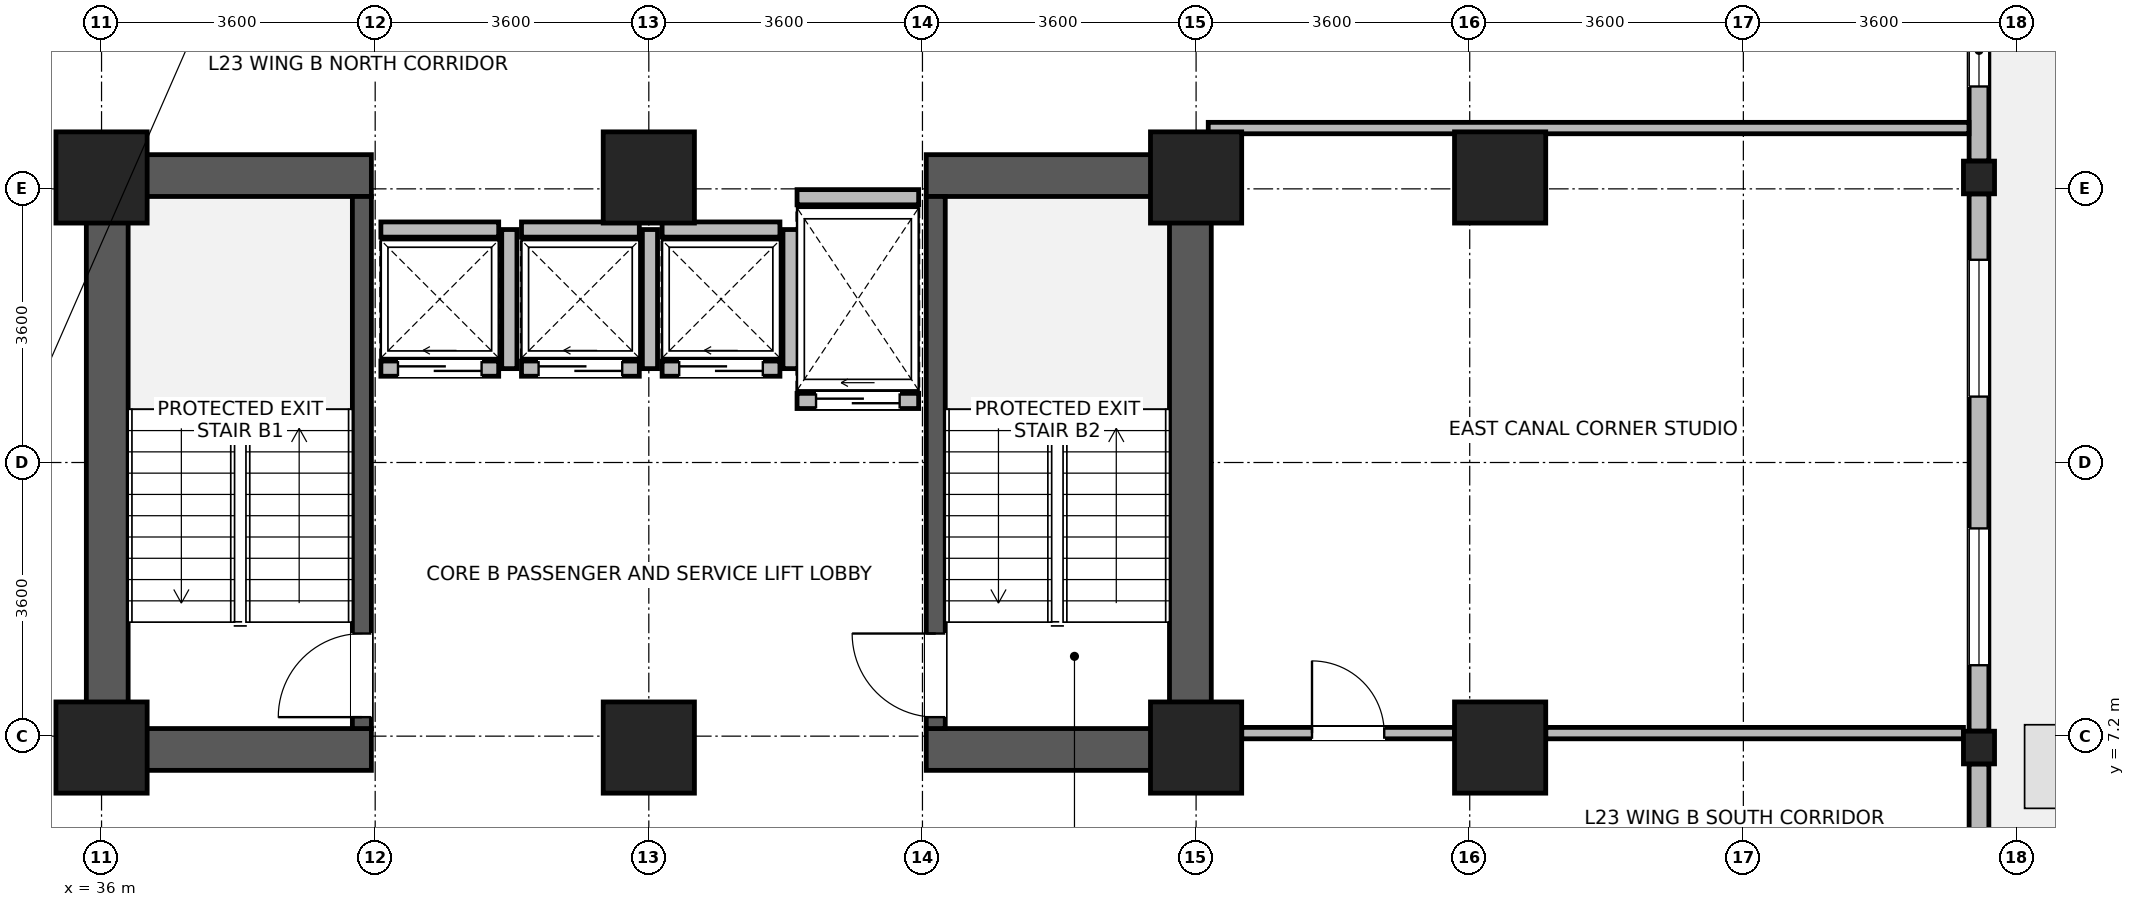
"""IFC4 building model, lengths in metres.
Left out: names, types, materials, properties, quantities, classifications, styles, units other than length and angle.
Written with IfcOpenShell. Run it as: python <this file> out.ifc"""

import sys

from ifc_helpers import new_model, si_unit, direction, frame, frame_2d, origin, origin_2d, place, context, subcontext, project, spatial, rectangle, i_section, extrude, source, transform, mapped, element, fill, save


model = new_model("IFC4")
c1 = context("Model", 3, precision=1e-05, world=origin(), true_north=direction((0.0, 1.0)))
c2 = subcontext(c1, "Body", "Model", "MODEL_VIEW")
j1 = project(units=[si_unit("LENGTHUNIT", "METRE"), si_unit("PLANEANGLEUNIT", "RADIAN")], contexts=[c1])
p1 = place(None, origin())
s1 = spatial("IfcSite", under=j1, at=p1, CompositionType="ELEMENT")
p2 = place(p1, origin())
s2 = spatial("IfcBuilding", under=s1, at=p2, CompositionType="ELEMENT")
p3 = place(p2, frame((0.0, 0.0, 93.4)))
s3 = spatial("IfcBuildingStorey", under=s2, at=p3, CompositionType="ELEMENT", Elevation=93.4)
for number, where, z_axis, x_axis in (
    (1, (36.075, 6.75, 0.0), (0.0, 0.0, 1.0), (0.0, 1.0, 0.0)),
    (2, (50.325, 6.75, 0.0), (0.0, 0.0, 1.0), (0.0, 1.0, 0.0)),
):
    element("IfcWall", number, at=place(p3, frame(where, z_axis=z_axis, x_axis=x_axis)), inside=s3, PredefinedType="SHEAR", context=c2, shape_type="SweptSolid", body=[
        extrude(rectangle(XDim=8.1, YDim=0.55, at=frame_2d((4.05, 0.0))), origin(), (0.0, 0.0, 1.0), 3.45),
    ])
for number, where, z_axis, x_axis in (
    (3, (36.35, 7.025, 0.0), (0.0, 0.0, 1.0), (1.0, 0.0, 0.0)),
    (4, (46.85, 7.025, 0.0), (0.0, 0.0, 1.0), (1.0, 0.0, 0.0)),
    (5, (36.35, 14.575, 0.0), (0.0, 0.0, 1.0), (1.0, 0.0, 0.0)),
    (6, (46.85, 14.575, 0.0), (0.0, 0.0, 1.0), (1.0, 0.0, 0.0)),
):
    element("IfcWall", number, at=place(p3, frame(where, z_axis=z_axis, x_axis=x_axis)), inside=s3, PredefinedType="SHEAR", context=c2, shape_type="SweptSolid", body=[
        extrude(rectangle(XDim=3.2, YDim=0.55, at=frame_2d((1.6, 0.0))), origin(), (0.0, 0.0, 1.0), 3.45),
    ])
p4 = place(p3, frame((39.425, 7.3, 0.0), z_axis=(0.0, 0.0, 1.0), x_axis=(0.0, 1.0, 0.0)))
e7 = element("IfcWall", 7, at=p4, inside=s3, PredefinedType="SHEAR", context=c2, shape_type="SweptSolid", body=[
    extrude(rectangle(XDim=7.0, YDim=0.25, at=frame_2d((3.5, 0.0))), origin(), (0.0, 0.0, 1.0), 3.45),
])
p5 = place(p4, frame((0.15, 0.0, 0.0)))
e8 = element("IfcOpeningElement", 8, at=p5, cuts=e7, PredefinedType="OPENING", context=c2, shape_type="SweptSolid", body=[
    extrude(rectangle(XDim=1.1, YDim=2.08, at=frame_2d((0.55, 1.04))), frame((0.0, 0.135, 0.0), z_axis=(0.0, -1.0, 0.0), x_axis=(1.0, 0.0, 0.0)), (0.0, 0.0, 1.0), 0.27),
])
p6 = place(p3, frame((46.975, 7.3, 0.0), z_axis=(0.0, 0.0, 1.0), x_axis=(0.0, 1.0, 0.0)))
e9 = element("IfcWall", 9, at=p6, inside=s3, PredefinedType="SHEAR", context=c2, shape_type="SweptSolid", body=[
    extrude(rectangle(XDim=7.0, YDim=0.25, at=frame_2d((3.5, 0.0))), origin(), (0.0, 0.0, 1.0), 3.45),
])
p7 = place(p6, frame((0.15, 0.0, 0.0)))
e10 = element("IfcOpeningElement", 10, at=p7, cuts=e9, PredefinedType="OPENING", context=c2, shape_type="SweptSolid", body=[
    extrude(rectangle(XDim=1.1, YDim=2.08, at=frame_2d((0.55, 1.04))), frame((0.0, 0.135, 0.0), z_axis=(0.0, -1.0, 0.0), x_axis=(1.0, 0.0, 0.0)), (0.0, 0.0, 1.0), 0.27),
])
m1 = source(origin(), c2, "Body", "SweptSolid", [
    extrude(rectangle(XDim=1.2, YDim=1.2, at=origin_2d()), origin(), (0.0, 0.0, 1.0), 3.7),
])
for number, where, z_axis, x_axis in (
    (11, (36.0, 7.05, 0.0), (0.0, 0.0, 1.0), (1.0, 0.0, 0.0)),
    (12, (36.0, 14.55, 0.0), (0.0, 0.0, 1.0), (1.0, 0.0, 0.0)),
    (13, (43.2, 7.05, 0.0), (0.0, 0.0, 1.0), (1.0, 0.0, 0.0)),
    (14, (43.2, 14.55, 0.0), (0.0, 0.0, 1.0), (1.0, 0.0, 0.0)),
    (15, (50.4, 7.05, 0.0), (0.0, 0.0, 1.0), (1.0, 0.0, 0.0)),
    (16, (50.4, 14.55, 0.0), (0.0, 0.0, 1.0), (1.0, 0.0, 0.0)),
    (17, (54.4, 7.05, 0.0), (0.0, 0.0, 1.0), (1.0, 0.0, 0.0)),
    (18, (54.4, 14.55, 0.0), (0.0, 0.0, 1.0), (1.0, 0.0, 0.0)),
):
    element("IfcColumn", number, at=place(p3, frame(where, z_axis=z_axis, x_axis=x_axis)), inside=s3, PredefinedType="COLUMN", context=c2, shape_type="MappedRepresentation", body=[
        mapped(m1, transform((0.0, 0.0, 0.0), x_axis=(1.0, 0.0, 0.0), y_axis=(0.0, 1.0, 0.0), z_axis=(0.0, 0.0, 1.0), scale=1.0)),
    ])
m2 = source(origin(), c2, "Body", "SweptSolid", [
    extrude(i_section(OverallWidth=0.409, OverallDepth=0.43, WebThickness=0.024, FlangeThickness=0.033, FilletRadius=0.015, at=origin_2d()), origin(), (0.0, 0.0, 1.0), 3.7),
])
for number, where, z_axis, x_axis in (
    (19, (60.7, 7.05, 0.0), (0.0, 0.0, 1.0), (1.0, 0.0, 0.0)),
    (20, (60.7, 14.55, 0.0), (0.0, 0.0, 1.0), (1.0, 0.0, 0.0)),
):
    element("IfcColumn", number, at=place(p3, frame(where, z_axis=z_axis, x_axis=x_axis)), inside=s3, PredefinedType="COLUMN", context=c2, shape_type="MappedRepresentation", body=[
        mapped(m2, transform((0.0, 0.0, 0.0), x_axis=(1.0, 0.0, 0.0), y_axis=(0.0, 1.0, 0.0), z_axis=(0.0, 0.0, 1.0), scale=1.0)),
    ])
p8 = place(p3, frame((60.7, 6.834, 0.0), z_axis=(0.0, 0.0, 1.0), x_axis=(0.0, -1.0, 0.0)))
e21 = element("IfcWall", 21, at=p8, inside=s3, PredefinedType="STANDARD", context=c2, shape_type="SweptSolid", body=[
    extrude(rectangle(XDim=5.164, YDim=0.26, at=frame_2d((2.582, 0.0))), origin(), (0.0, 0.0, 1.0), 3.43),
])
p9 = place(p8, frame((2.865, 0.0, 0.0)))
e22 = element("IfcOpeningElement", 22, at=p9, cuts=e21, PredefinedType="OPENING", context=c2, shape_type="SweptSolid", body=[
    extrude(rectangle(XDim=1.5, YDim=2.15, at=frame_2d((0.75, 1.075))), frame((0.0, 0.14, 0.0), z_axis=(0.0, -1.0, 0.0), x_axis=(1.0, 0.0, 0.0)), (0.0, 0.0, 1.0), 0.28),
])
p10 = place(p3, frame((60.7, 14.334, 0.0), z_axis=(0.0, 0.0, 1.0), x_axis=(0.0, -1.0, 0.0)))
e23 = element("IfcWall", 23, at=p10, inside=s3, PredefinedType="STANDARD", context=c2, shape_type="SweptSolid", body=[
    extrude(rectangle(XDim=7.068, YDim=0.26, at=frame_2d((3.534, 0.0))), origin(), (0.0, 0.0, 1.0), 2.93),
])
p11 = place(p10, frame((0.867, 0.0, 0.85)))
e24 = element("IfcOpeningElement", 24, at=p11, cuts=e23, PredefinedType="OPENING", context=c2, shape_type="SweptSolid", body=[
    extrude(rectangle(XDim=1.8, YDim=1.85, at=frame_2d((0.9, 0.925))), frame((0.0, 0.14, 0.0), z_axis=(0.0, -1.0, 0.0), x_axis=(1.0, 0.0, 0.0)), (0.0, 0.0, 1.0), 0.28),
])
p12 = place(p10, frame((4.401, 0.0, 0.85)))
e25 = element("IfcOpeningElement", 25, at=p12, cuts=e23, PredefinedType="OPENING", context=c2, shape_type="SweptSolid", body=[
    extrude(rectangle(XDim=1.8, YDim=1.85, at=frame_2d((0.9, 0.925))), frame((0.0, 0.14, 0.0), z_axis=(0.0, -1.0, 0.0), x_axis=(1.0, 0.0, 0.0)), (0.0, 0.0, 1.0), 0.28),
])
p13 = place(p3, frame((60.7, 21.384, 0.0), z_axis=(0.0, 0.0, 1.0), x_axis=(0.0, -1.0, 0.0)))
e26 = element("IfcWall", 26, at=p13, inside=s3, PredefinedType="STANDARD", context=c2, shape_type="SweptSolid", body=[
    extrude(rectangle(XDim=6.618, YDim=0.26, at=frame_2d((3.309, 0.0))), origin(), (0.0, 0.0, 1.0), 2.93),
])
p14 = place(p13, frame((0.754, 0.0, 0.85)))
e27 = element("IfcOpeningElement", 27, at=p14, cuts=e26, PredefinedType="OPENING", context=c2, shape_type="SweptSolid", body=[
    extrude(rectangle(XDim=1.8, YDim=1.85, at=frame_2d((0.9, 0.925))), frame((0.0, 0.14, 0.0), z_axis=(0.0, -1.0, 0.0), x_axis=(1.0, 0.0, 0.0)), (0.0, 0.0, 1.0), 0.28),
])
p15 = place(p13, frame((4.687, 0.0, 0.85)))
e28 = element("IfcOpeningElement", 28, at=p15, cuts=e26, PredefinedType="OPENING", context=c2, shape_type="SweptSolid", body=[
    extrude(rectangle(XDim=0.95, YDim=1.75, at=frame_2d((0.475, 0.875))), frame((0.0, 0.14, 0.0), z_axis=(0.0, -1.0, 0.0), x_axis=(1.0, 0.0, 0.0)), (0.0, 0.0, 1.0), 0.28),
])
p16 = place(p3, frame((39.675, 12.035, 0.0), z_axis=(0.0, 0.0, 1.0), x_axis=(1.0, 0.0, 0.0)))
e29 = element("IfcWall", 29, at=p16, inside=s3, PredefinedType="PARTITIONING", context=c2, shape_type="SweptSolid", body=[
    extrude(rectangle(XDim=1.55, YDim=0.2, at=frame_2d((0.775, 0.0))), origin(), (0.0, 0.0, 1.0), 3.43),
])
p17 = place(p16, frame((0.225, 0.0, 0.0)))
e30 = element("IfcOpeningElement", 30, at=p17, cuts=e29, PredefinedType="OPENING", context=c2, shape_type="SweptSolid", body=[
    extrude(rectangle(XDim=1.1, YDim=2.12, at=frame_2d((0.55, 1.06))), frame((0.0, 0.11, 0.0), z_axis=(0.0, -1.0, 0.0), x_axis=(1.0, 0.0, 0.0)), (0.0, 0.0, 1.0), 0.22),
])
p18 = place(p3, frame((39.675, 13.865, 0.0), z_axis=(0.0, 0.0, 1.0), x_axis=(1.0, 0.0, 0.0)))
e31 = element("IfcWall", 31, at=p18, inside=s3, PredefinedType="PARTITIONING", context=c2, shape_type="SweptSolid", body=[
    extrude(rectangle(XDim=1.55, YDim=0.2, at=frame_2d((0.775, 0.0))), origin(), (0.0, 0.0, 1.0), 3.43),
])
p19 = place(p3, frame((41.365, 12.035, 0.0), z_axis=(0.0, 0.0, 1.0), x_axis=(0.0, 1.0, 0.0)))
e32 = element("IfcWall", 32, at=p19, inside=s3, PredefinedType="PARTITIONING", context=c2, shape_type="SweptSolid", body=[
    extrude(rectangle(XDim=1.83, YDim=0.2, at=frame_2d((0.915, 0.0))), origin(), (0.0, 0.0, 1.0), 3.43),
])
p20 = place(p3, frame((41.525, 12.035, 0.0), z_axis=(0.0, 0.0, 1.0), x_axis=(1.0, 0.0, 0.0)))
e33 = element("IfcWall", 33, at=p20, inside=s3, PredefinedType="PARTITIONING", context=c2, shape_type="SweptSolid", body=[
    extrude(rectangle(XDim=1.55, YDim=0.2, at=frame_2d((0.775, 0.0))), origin(), (0.0, 0.0, 1.0), 3.43),
])
p21 = place(p20, frame((0.225, 0.0, 0.0)))
e34 = element("IfcOpeningElement", 34, at=p21, cuts=e33, PredefinedType="OPENING", context=c2, shape_type="SweptSolid", body=[
    extrude(rectangle(XDim=1.1, YDim=2.12, at=frame_2d((0.55, 1.06))), frame((0.0, 0.11, 0.0), z_axis=(0.0, -1.0, 0.0), x_axis=(1.0, 0.0, 0.0)), (0.0, 0.0, 1.0), 0.22),
])
p22 = place(p3, frame((41.525, 13.865, 0.0), z_axis=(0.0, 0.0, 1.0), x_axis=(1.0, 0.0, 0.0)))
e35 = element("IfcWall", 35, at=p22, inside=s3, PredefinedType="PARTITIONING", context=c2, shape_type="SweptSolid", body=[
    extrude(rectangle(XDim=1.55, YDim=0.2, at=frame_2d((0.775, 0.0))), origin(), (0.0, 0.0, 1.0), 3.43),
])
p23 = place(p3, frame((43.215, 12.035, 0.0), z_axis=(0.0, 0.0, 1.0), x_axis=(0.0, 1.0, 0.0)))
e36 = element("IfcWall", 36, at=p23, inside=s3, PredefinedType="PARTITIONING", context=c2, shape_type="SweptSolid", body=[
    extrude(rectangle(XDim=1.83, YDim=0.2, at=frame_2d((0.915, 0.0))), origin(), (0.0, 0.0, 1.0), 3.43),
])
p24 = place(p3, frame((43.375, 12.035, 0.0), z_axis=(0.0, 0.0, 1.0), x_axis=(1.0, 0.0, 0.0)))
e37 = element("IfcWall", 37, at=p24, inside=s3, PredefinedType="PARTITIONING", context=c2, shape_type="SweptSolid", body=[
    extrude(rectangle(XDim=1.55, YDim=0.2, at=frame_2d((0.775, 0.0))), origin(), (0.0, 0.0, 1.0), 3.43),
])
p25 = place(p24, frame((0.225, 0.0, 0.0)))
e38 = element("IfcOpeningElement", 38, at=p25, cuts=e37, PredefinedType="OPENING", context=c2, shape_type="SweptSolid", body=[
    extrude(rectangle(XDim=1.1, YDim=2.12, at=frame_2d((0.55, 1.06))), frame((0.0, 0.11, 0.0), z_axis=(0.0, -1.0, 0.0), x_axis=(1.0, 0.0, 0.0)), (0.0, 0.0, 1.0), 0.22),
])
p26 = place(p3, frame((43.375, 13.865, 0.0), z_axis=(0.0, 0.0, 1.0), x_axis=(1.0, 0.0, 0.0)))
e39 = element("IfcWall", 39, at=p26, inside=s3, PredefinedType="PARTITIONING", context=c2, shape_type="SweptSolid", body=[
    extrude(rectangle(XDim=1.55, YDim=0.2, at=frame_2d((0.775, 0.0))), origin(), (0.0, 0.0, 1.0), 3.43),
])
p27 = place(p3, frame((45.065, 12.035, 0.0), z_axis=(0.0, 0.0, 1.0), x_axis=(0.0, 1.0, 0.0)))
e40 = element("IfcWall", 40, at=p27, inside=s3, PredefinedType="PARTITIONING", context=c2, shape_type="SweptSolid", body=[
    extrude(rectangle(XDim=1.83, YDim=0.2, at=frame_2d((0.915, 0.0))), origin(), (0.0, 0.0, 1.0), 3.43),
])
p28 = place(p3, frame((45.15, 11.61, 0.0), z_axis=(0.0, 0.0, 1.0), x_axis=(1.0, 0.0, 0.0)))
e41 = element("IfcWall", 41, at=p28, inside=s3, PredefinedType="PARTITIONING", context=c2, shape_type="SweptSolid", body=[
    extrude(rectangle(XDim=1.6, YDim=0.2, at=frame_2d((0.8, 0.0))), origin(), (0.0, 0.0, 1.0), 3.43),
])
p29 = place(p28, frame((0.25, 0.0, 0.0)))
e42 = element("IfcOpeningElement", 42, at=p29, cuts=e41, PredefinedType="OPENING", context=c2, shape_type="SweptSolid", body=[
    extrude(rectangle(XDim=1.1, YDim=2.12, at=frame_2d((0.55, 1.06))), frame((0.0, 0.11, 0.0), z_axis=(0.0, -1.0, 0.0), x_axis=(1.0, 0.0, 0.0)), (0.0, 0.0, 1.0), 0.22),
])
p30 = place(p3, frame((45.15, 14.29, 0.0), z_axis=(0.0, 0.0, 1.0), x_axis=(1.0, 0.0, 0.0)))
e43 = element("IfcWall", 43, at=p30, inside=s3, PredefinedType="PARTITIONING", context=c2, shape_type="SweptSolid", body=[
    extrude(rectangle(XDim=1.6, YDim=0.2, at=frame_2d((0.8, 0.0))), origin(), (0.0, 0.0, 1.0), 2.23),
])
p31 = place(p3, frame((51.0, 7.24, 0.0), z_axis=(0.0, 0.0, 1.0), x_axis=(1.0, 0.0, 0.0)))
e44 = element("IfcWall", 44, at=p31, inside=s3, PredefinedType="PARTITIONING", context=c2, shape_type="SweptSolid", body=[
    extrude(rectangle(XDim=2.8, YDim=0.15, at=frame_2d((1.4, 0.0))), origin(), (0.0, 0.0, 1.0), 2.78),
])
p32 = place(p31, frame((0.925, 0.0, 0.0)))
e45 = element("IfcOpeningElement", 45, at=p32, cuts=e44, PredefinedType="OPENING", context=c2, shape_type="SweptSolid", body=[
    extrude(rectangle(XDim=0.95, YDim=2.1, at=frame_2d((0.475, 1.05))), frame((0.0, 0.085, 0.0), z_axis=(0.0, -1.0, 0.0), x_axis=(1.0, 0.0, 0.0)), (0.0, 0.0, 1.0), 0.17),
])
p33 = place(p3, frame((55.0, 7.24, 0.0), z_axis=(0.0, 0.0, 1.0), x_axis=(1.0, 0.0, 0.0)))
e46 = element("IfcWall", 46, at=p33, inside=s3, PredefinedType="PARTITIONING", context=c2, shape_type="SweptSolid", body=[
    extrude(rectangle(XDim=5.496, YDim=0.15, at=frame_2d((2.748, 0.0))), origin(), (0.0, 0.0, 1.0), 2.78),
])
p34 = place(p3, frame((50.56, 15.2, 0.0), z_axis=(0.0, 0.0, 1.0), x_axis=(1.0, 0.0, 0.0)))
e47 = element("IfcWall", 47, at=p34, inside=s3, PredefinedType="PARTITIONING", context=c2, shape_type="SweptSolid", body=[
    extrude(rectangle(XDim=10.008, YDim=0.15, at=frame_2d((5.004, 0.0))), origin(), (0.0, 0.0, 1.0), 3.43),
])
p35 = place(p11, origin())
e48 = element("IfcWindow", 48, at=p35, inside=s3, PartitioningType="SINGLE_PANEL", PredefinedType="WINDOW", context=c2, shape_type="SweptSolid", body=[
    extrude(rectangle(XDim=1.8, YDim=1.85, at=frame_2d((0.9, 0.925))), frame((0.0, 0.03, 0.0), z_axis=(0.0, -1.0, 0.0), x_axis=(1.0, 0.0, 0.0)), (0.0, 0.0, 1.0), 0.06),
])
fill(e24, e48)
p36 = place(p12, origin())
e49 = element("IfcWindow", 49, at=p36, inside=s3, PartitioningType="SINGLE_PANEL", PredefinedType="WINDOW", context=c2, shape_type="SweptSolid", body=[
    extrude(rectangle(XDim=1.8, YDim=1.85, at=frame_2d((0.9, 0.925))), frame((0.0, 0.03, 0.0), z_axis=(0.0, -1.0, 0.0), x_axis=(1.0, 0.0, 0.0)), (0.0, 0.0, 1.0), 0.06),
])
fill(e25, e49)
p37 = place(p15, origin())
e50 = element("IfcWindow", 50, at=p37, inside=s3, PartitioningType="SINGLE_PANEL", PredefinedType="WINDOW", context=c2, shape_type="SweptSolid", body=[
    extrude(rectangle(XDim=0.95, YDim=1.75, at=frame_2d((0.475, 0.875))), frame((0.0, 0.03, 0.0), z_axis=(0.0, -1.0, 0.0), x_axis=(1.0, 0.0, 0.0)), (0.0, 0.0, 1.0), 0.06),
])
fill(e28, e50)
p38 = place(p5, origin())
e51 = element("IfcDoor", 51, at=p38, inside=s3, OperationType="SINGLE_SWING_LEFT", PredefinedType="DOOR", context=c2, shape_type="SweptSolid", body=[
    extrude(rectangle(XDim=1.1, YDim=2.08, at=frame_2d((0.55, 1.04))), frame((0.0, 0.025, 0.0), z_axis=(0.0, -1.0, 0.0), x_axis=(1.0, 0.0, 0.0)), (0.0, 0.0, 1.0), 0.05),
])
fill(e8, e51)
p39 = place(p7, origin())
e52 = element("IfcDoor", 52, at=p39, inside=s3, OperationType="SINGLE_SWING_RIGHT", PredefinedType="DOOR", context=c2, shape_type="SweptSolid", body=[
    extrude(rectangle(XDim=1.1, YDim=2.08, at=frame_2d((0.55, 1.04))), frame((0.0, 0.025, 0.0), z_axis=(0.0, -1.0, 0.0), x_axis=(1.0, 0.0, 0.0)), (0.0, 0.0, 1.0), 0.05),
])
fill(e10, e52)
p40 = place(p17, origin())
e53 = element("IfcDoor", 53, at=p40, inside=s3, OperationType="SLIDING_TO_LEFT", PredefinedType="DOOR", context=c2, shape_type="SweptSolid", body=[
    extrude(rectangle(XDim=1.1, YDim=2.12, at=frame_2d((0.55, 1.06))), frame((0.0, 0.025, 0.0), z_axis=(0.0, -1.0, 0.0), x_axis=(1.0, 0.0, 0.0)), (0.0, 0.0, 1.0), 0.05),
])
fill(e30, e53)
p41 = place(p21, origin())
e54 = element("IfcDoor", 54, at=p41, inside=s3, OperationType="SLIDING_TO_LEFT", PredefinedType="DOOR", context=c2, shape_type="SweptSolid", body=[
    extrude(rectangle(XDim=1.1, YDim=2.12, at=frame_2d((0.55, 1.06))), frame((0.0, 0.025, 0.0), z_axis=(0.0, -1.0, 0.0), x_axis=(1.0, 0.0, 0.0)), (0.0, 0.0, 1.0), 0.05),
])
fill(e34, e54)
p42 = place(p25, origin())
e55 = element("IfcDoor", 55, at=p42, inside=s3, OperationType="SLIDING_TO_LEFT", PredefinedType="DOOR", context=c2, shape_type="SweptSolid", body=[
    extrude(rectangle(XDim=1.1, YDim=2.12, at=frame_2d((0.55, 1.06))), frame((0.0, 0.025, 0.0), z_axis=(0.0, -1.0, 0.0), x_axis=(1.0, 0.0, 0.0)), (0.0, 0.0, 1.0), 0.05),
])
fill(e38, e55)
p43 = place(p29, origin())
e56 = element("IfcDoor", 56, at=p43, inside=s3, OperationType="SLIDING_TO_LEFT", PredefinedType="DOOR", context=c2, shape_type="SweptSolid", body=[
    extrude(rectangle(XDim=1.1, YDim=2.12, at=frame_2d((0.55, 1.06))), frame((0.0, 0.025, 0.0), z_axis=(0.0, -1.0, 0.0), x_axis=(1.0, 0.0, 0.0)), (0.0, 0.0, 1.0), 0.05),
])
fill(e42, e56)
p44 = place(p32, origin())
e57 = element("IfcDoor", 57, at=p44, inside=s3, OperationType="SINGLE_SWING_LEFT", PredefinedType="DOOR", context=c2, shape_type="SweptSolid", body=[
    extrude(rectangle(XDim=0.95, YDim=2.1, at=frame_2d((0.475, 1.05))), frame((0.0, 0.025, 0.0), z_axis=(0.0, -1.0, 0.0), x_axis=(1.0, 0.0, 0.0)), (0.0, 0.0, 1.0), 0.05),
])
fill(e45, e57)
save(model, sys.argv[1])
